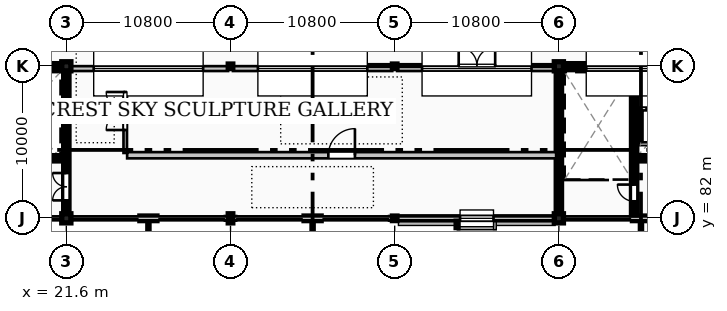
"""IFC4 building model, lengths in metres.
Left out: names, types, materials, properties, quantities, classifications, styles, units other than length and angle.
Written with IfcOpenShell. Run it as: python <this file> out.ifc"""

import sys

from ifc_helpers import new_model, si_unit, direction, frame, frame_2d, origin, origin_2d, place, context, subcontext, project, spatial, rectangle, i_section, extrude, element, fill, save


model = new_model("IFC4")
c1 = context("Model", 3, precision=1e-05, world=origin(), true_north=direction((0.0, 1.0)))
c2 = subcontext(c1, "Body", "Model", "MODEL_VIEW")
j1 = project(units=[si_unit("LENGTHUNIT", "METRE"), si_unit("PLANEANGLEUNIT", "RADIAN")], contexts=[c1])
p1 = place(None, origin())
s1 = spatial("IfcSite", under=j1, at=p1, CompositionType="ELEMENT")
p2 = place(p1, origin())
s2 = spatial("IfcBuilding", under=s1, at=p2, CompositionType="ELEMENT")
p3 = place(p2, frame((0.0, 0.0, 28.8)))
s3 = spatial("IfcBuildingStorey", under=s2, at=p3, CompositionType="ELEMENT", Elevation=28.8)
for number, where, z_axis, x_axis in (
    (1, (21.6, 82.0, 0.0), (0.0, 0.0, 1.0), (1.0, 0.0, 0.0)),
    (2, (21.6, 92.0, 0.0), (0.0, 0.0, 1.0), (1.0, 0.0, 0.0)),
):
    element("IfcColumn", number, at=place(p3, frame(where, z_axis=z_axis, x_axis=x_axis)), inside=s3, PredefinedType="COLUMN", context=c2, shape_type="SweptSolid", body=[
        extrude(rectangle(XDim=0.6, YDim=0.6, at=origin_2d()), origin(), (0.0, 0.0, 1.0), 5.4),
    ])
p4 = place(p3, frame((32.4, 82.0, 0.0), z_axis=(0.0, 0.0, 1.0), x_axis=(1.0, 0.0, 0.0)))
e3 = element("IfcColumn", 3, at=p4, inside=s3, PredefinedType="COLUMN", context=c2, shape_type="SweptSolid", body=[
    extrude(i_section(OverallWidth=0.3, OverallDepth=0.6, WebThickness=0.015, FlangeThickness=0.03, FilletRadius=0.027, at=origin_2d()), origin(), (0.0, 0.0, 1.0), 5.4),
])
for number, where, z_axis, x_axis in (
    (4, (32.4, 92.0, 0.0), (0.0, 0.0, 1.0), (1.0, 0.0, 0.0)),
    (5, (43.2, 82.0, 0.0), (0.0, 0.0, 1.0), (1.0, 0.0, 0.0)),
    (6, (43.2, 92.0, 0.0), (0.0, 0.0, 1.0), (1.0, 0.0, 0.0)),
):
    element("IfcColumn", number, at=place(p3, frame(where, z_axis=z_axis, x_axis=x_axis)), inside=s3, PredefinedType="COLUMN", context=c2, shape_type="SweptSolid", body=[
        extrude(i_section(OverallWidth=0.3, OverallDepth=0.3, WebThickness=0.011, FlangeThickness=0.019, FilletRadius=0.027, at=origin_2d()), origin(), (0.0, 0.0, 1.0), 5.4),
    ])
for number, where, z_axis, x_axis in (
    (7, (54.0, 82.0, 0.0), (0.0, 0.0, 1.0), (1.0, 0.0, 0.0)),
    (8, (54.0, 92.0, 0.0), (0.0, 0.0, 1.0), (1.0, 0.0, 0.0)),
):
    element("IfcColumn", number, at=place(p3, frame(where, z_axis=z_axis, x_axis=x_axis)), inside=s3, PredefinedType="COLUMN", context=c2, shape_type="SweptSolid", body=[
        extrude(rectangle(XDim=0.6, YDim=0.6, at=origin_2d()), origin(), (0.0, 0.0, 1.0), 5.4),
    ])
p5 = place(p3, frame((21.23, 82.0, 0.0), z_axis=(0.0, 0.0, 1.0), x_axis=(1.0, 0.0, 0.0)))
e9 = element("IfcWall", 9, at=p5, inside=s3, PredefinedType="STANDARD", context=c2, shape_type="SweptSolid", body=[
    extrude(rectangle(XDim=0.225, YDim=0.3, at=frame_2d((0.113, 0.0))), origin(), (0.0, 0.0, 1.0), 5.16),
])
p6 = place(p3, frame((26.35, 82.0, 0.0), z_axis=(0.0, 0.0, 1.0), x_axis=(1.0, 0.0, 0.0)))
e10 = element("IfcWall", 10, at=p6, inside=s3, PredefinedType="STANDARD", context=c2, shape_type="SweptSolid", body=[
    extrude(rectangle(XDim=1.3, YDim=0.48, at=frame_2d((0.65, 0.0))), origin(), (0.0, 0.0, 1.0), 5.044),
])
for number, where, z_axis, x_axis in (
    (11, (21.745, 82.0, 0.0), (0.0, 0.0, 1.0), (1.0, 0.0, 0.0)),
    (12, (32.03, 82.0, 0.0), (0.0, 0.0, 1.0), (1.0, 0.0, 0.0)),
):
    element("IfcWall", number, at=place(p3, frame(where, z_axis=z_axis, x_axis=x_axis)), inside=s3, PredefinedType="STANDARD", context=c2, shape_type="SweptSolid", body=[
        extrude(rectangle(XDim=0.225, YDim=0.3, at=frame_2d((0.112, 0.0))), origin(), (0.0, 0.0, 1.0), 5.16),
    ])
p7 = place(p3, frame((37.15, 82.0, 0.0), z_axis=(0.0, 0.0, 1.0), x_axis=(1.0, 0.0, 0.0)))
e13 = element("IfcWall", 13, at=p7, inside=s3, PredefinedType="STANDARD", context=c2, shape_type="SweptSolid", body=[
    extrude(rectangle(XDim=1.3, YDim=0.48, at=frame_2d((0.65, 0.0))), origin(), (0.0, 0.0, 1.0), 5.044),
])
p8 = place(p3, frame((32.545, 82.0, 0.0), z_axis=(0.0, 0.0, 1.0), x_axis=(1.0, 0.0, 0.0)))
e14 = element("IfcWall", 14, at=p8, inside=s3, PredefinedType="STANDARD", context=c2, shape_type="SweptSolid", body=[
    extrude(rectangle(XDim=0.225, YDim=0.3, at=frame_2d((0.113, 0.0))), origin(), (0.0, 0.0, 1.0), 5.16),
])
p9 = place(p3, frame((42.83, 82.0, 0.0), z_axis=(0.0, 0.0, 1.0), x_axis=(1.0, 0.0, 0.0)))
e15 = element("IfcWall", 15, at=p9, inside=s3, PredefinedType="STANDARD", context=c2, shape_type="SweptSolid", body=[
    extrude(rectangle(XDim=0.225, YDim=0.3, at=frame_2d((0.112, 0.0))), origin(), (0.0, 0.0, 1.0), 5.16),
])
p10 = place(p3, frame((43.345, 82.0, 0.0), z_axis=(0.0, 0.0, 1.0), x_axis=(1.0, 0.0, 0.0)))
e16 = element("IfcWall", 16, at=p10, inside=s3, PredefinedType="STANDARD", context=c2, shape_type="SweptSolid", body=[
    extrude(rectangle(XDim=10.51, YDim=0.38, at=frame_2d((5.255, 0.0))), origin(), (0.0, 0.0, 1.0), 5.044),
])
p11 = place(p10, frame((4.155, 0.0, 1.0)))
e17 = element("IfcOpeningElement", 17, at=p11, cuts=e16, PredefinedType="OPENING", context=c2, shape_type="SweptSolid", body=[
    extrude(rectangle(XDim=2.2, YDim=3.0, at=frame_2d((1.1, 1.5))), frame((0.0, 0.2, 0.0), z_axis=(0.0, -1.0, 0.0), x_axis=(1.0, 0.0, 0.0)), (0.0, 0.0, 1.0), 0.4),
])
p12 = place(p3, frame((58.75, 82.0, 0.0), z_axis=(0.0, 0.0, 1.0), x_axis=(1.0, 0.0, 0.0)))
e18 = element("IfcWall", 18, at=p12, inside=s3, PredefinedType="STANDARD", context=c2, shape_type="SweptSolid", body=[
    extrude(rectangle(XDim=1.3, YDim=0.48, at=frame_2d((0.65, 0.0))), origin(), (0.0, 0.0, 1.0), 5.044),
])
p13 = place(p3, frame((54.145, 82.0, 0.0), z_axis=(0.0, 0.0, 1.0), x_axis=(1.0, 0.0, 0.0)))
e19 = element("IfcWall", 19, at=p13, inside=s3, PredefinedType="STANDARD", context=c2, shape_type="SweptSolid", body=[
    extrude(rectangle(XDim=0.225, YDim=0.3, at=frame_2d((0.113, 0.0))), origin(), (0.0, 0.0, 1.0), 5.16),
])
p14 = place(p3, frame((10.96, 91.85, 5.4), z_axis=(0.0, 0.0, 1.0), x_axis=(1.0, 0.0, 0.0)))
e20 = element("IfcWall", 20, at=p14, inside=s3, PredefinedType="STANDARD", context=c2, shape_type="SweptSolid", body=[
    extrude(rectangle(XDim=10.48, YDim=0.32, at=frame_2d((5.24, 0.0))), origin(), (0.0, 0.0, 1.0), 2.45),
])
p15 = place(p14, frame((1.64, 0.0, 0.45)))
e21 = element("IfcOpeningElement", 21, at=p15, cuts=e20, PredefinedType="OPENING", context=c2, shape_type="SweptSolid", body=[
    extrude(rectangle(XDim=7.2, YDim=1.5, at=frame_2d((3.6, 0.75))), frame((0.0, 0.17, 0.0), z_axis=(0.0, -1.0, 0.0), x_axis=(1.0, 0.0, 0.0)), (0.0, 0.0, 1.0), 0.34),
])
p16 = place(p3, frame((21.76, 91.85, 5.4), z_axis=(0.0, 0.0, 1.0), x_axis=(1.0, 0.0, 0.0)))
e22 = element("IfcWall", 22, at=p16, inside=s3, PredefinedType="STANDARD", context=c2, shape_type="SweptSolid", body=[
    extrude(rectangle(XDim=10.48, YDim=0.32, at=frame_2d((5.24, 0.0))), origin(), (0.0, 0.0, 1.0), 2.45),
])
p17 = place(p16, frame((1.64, 0.0, 0.45)))
e23 = element("IfcOpeningElement", 23, at=p17, cuts=e22, PredefinedType="OPENING", context=c2, shape_type="SweptSolid", body=[
    extrude(rectangle(XDim=7.2, YDim=1.5, at=frame_2d((3.6, 0.75))), frame((0.0, 0.17, 0.0), z_axis=(0.0, -1.0, 0.0), x_axis=(1.0, 0.0, 0.0)), (0.0, 0.0, 1.0), 0.34),
])
p18 = place(p3, frame((32.56, 91.85, 5.4), z_axis=(0.0, 0.0, 1.0), x_axis=(1.0, 0.0, 0.0)))
e24 = element("IfcWall", 24, at=p18, inside=s3, PredefinedType="STANDARD", context=c2, shape_type="SweptSolid", body=[
    extrude(rectangle(XDim=10.48, YDim=0.32, at=frame_2d((5.24, 0.0))), origin(), (0.0, 0.0, 1.0), 2.45),
])
p19 = place(p18, frame((1.64, 0.0, 0.45)))
e25 = element("IfcOpeningElement", 25, at=p19, cuts=e24, PredefinedType="OPENING", context=c2, shape_type="SweptSolid", body=[
    extrude(rectangle(XDim=7.2, YDim=1.5, at=frame_2d((3.6, 0.75))), frame((0.0, 0.17, 0.0), z_axis=(0.0, -1.0, 0.0), x_axis=(1.0, 0.0, 0.0)), (0.0, 0.0, 1.0), 0.34),
])
p20 = place(p3, frame((43.36, 91.85, 5.4), z_axis=(0.0, 0.0, 1.0), x_axis=(1.0, 0.0, 0.0)))
e26 = element("IfcWall", 26, at=p20, inside=s3, PredefinedType="STANDARD", context=c2, shape_type="SweptSolid", body=[
    extrude(rectangle(XDim=10.48, YDim=0.32, at=frame_2d((5.24, 0.0))), origin(), (0.0, 0.0, 1.0), 2.45),
])
p21 = place(p20, frame((1.64, 0.0, 0.45)))
e27 = element("IfcOpeningElement", 27, at=p21, cuts=e26, PredefinedType="OPENING", context=c2, shape_type="SweptSolid", body=[
    extrude(rectangle(XDim=7.2, YDim=1.5, at=frame_2d((3.6, 0.75))), frame((0.0, 0.17, 0.0), z_axis=(0.0, -1.0, 0.0), x_axis=(1.0, 0.0, 0.0)), (0.0, 0.0, 1.0), 0.34),
])
p22 = place(p3, frame((54.16, 91.85, 5.4), z_axis=(0.0, 0.0, 1.0), x_axis=(1.0, 0.0, 0.0)))
e28 = element("IfcWall", 28, at=p22, inside=s3, PredefinedType="STANDARD", context=c2, shape_type="SweptSolid", body=[
    extrude(rectangle(XDim=10.48, YDim=0.32, at=frame_2d((5.24, 0.0))), origin(), (0.0, 0.0, 1.0), 2.45),
])
p23 = place(p22, frame((1.64, 0.0, 0.45)))
e29 = element("IfcOpeningElement", 29, at=p23, cuts=e28, PredefinedType="OPENING", context=c2, shape_type="SweptSolid", body=[
    extrude(rectangle(XDim=7.2, YDim=1.5, at=frame_2d((3.6, 0.75))), frame((0.0, 0.17, 0.0), z_axis=(0.0, -1.0, 0.0), x_axis=(1.0, 0.0, 0.0)), (0.0, 0.0, 1.0), 0.34),
])
p24 = place(p3, frame((0.35, 82.0, 5.22), z_axis=(0.0, 0.0, 1.0), x_axis=(1.0, 0.0, 0.0)))
e30 = element("IfcWall", 30, at=p24, inside=s3, PredefinedType="PARAPET", context=c2, shape_type="SweptSolid", body=[
    extrude(rectangle(XDim=74.9, YDim=0.26, at=frame_2d((37.45, 0.0))), origin(), (0.0, 0.0, 1.0), 0.55),
])
p25 = place(p3, frame((11.1, 92.0, 0.0), z_axis=(0.0, 0.0, 1.0), x_axis=(1.0, 0.0, 0.0)))
e31 = element("IfcWall", 31, at=p25, inside=s3, PredefinedType="SHEAR", context=c2, shape_type="SweptSolid", body=[
    extrude(rectangle(XDim=10.2, YDim=0.35, at=frame_2d((5.1, 0.0))), origin(), (0.0, 0.0, 1.0), 5.16),
])
p26 = place(p3, frame((21.6, 82.3, 0.0), z_axis=(0.0, 0.0, 1.0), x_axis=(0.0, 1.0, 0.0)))
e32 = element("IfcWall", 32, at=p26, inside=s3, PredefinedType="SHEAR", context=c2, shape_type="SweptSolid", body=[
    extrude(rectangle(XDim=9.4, YDim=0.35, at=frame_2d((4.7, 0.0))), origin(), (0.0, 0.0, 1.0), 5.16),
])
p27 = place(p26, frame((0.88, 0.0, 0.0)))
e33 = element("IfcOpeningElement", 33, at=p27, cuts=e32, PredefinedType="OPENING", context=c2, shape_type="SweptSolid", body=[
    extrude(rectangle(XDim=1.8, YDim=2.25, at=frame_2d((0.9, 1.125))), frame((0.0, 0.185, 0.0), z_axis=(0.0, -1.0, 0.0), x_axis=(1.0, 0.0, 0.0)), (0.0, 0.0, 1.0), 0.37),
])
p28 = place(p3, frame((15.93, 85.95, 0.0), z_axis=(0.0, 0.0, 1.0), x_axis=(1.0, 0.0, 0.0)))
e34 = element("IfcWall", 34, at=p28, inside=s3, PredefinedType="SHEAR", context=c2, shape_type="SweptSolid", body=[
    extrude(rectangle(XDim=5.49, YDim=0.35, at=frame_2d((2.745, 0.0))), origin(), (0.0, 0.0, 1.0), 5.16),
])
p29 = place(p28, frame((0.65, 0.0, 0.0)))
e35 = element("IfcOpeningElement", 35, at=p29, cuts=e34, PredefinedType="OPENING", context=c2, shape_type="SweptSolid", body=[
    extrude(rectangle(XDim=1.1, YDim=2.2, at=frame_2d((0.55, 1.1))), frame((0.0, 0.185, 0.0), z_axis=(0.0, -1.0, 0.0), x_axis=(1.0, 0.0, 0.0)), (0.0, 0.0, 1.0), 0.37),
])
p30 = place(p28, frame((2.85, 0.0, 0.0)))
e36 = element("IfcOpeningElement", 36, at=p30, cuts=e34, PredefinedType="OPENING", context=c2, shape_type="SweptSolid", body=[
    extrude(rectangle(XDim=1.1, YDim=2.2, at=frame_2d((0.55, 1.1))), frame((0.0, 0.185, 0.0), z_axis=(0.0, -1.0, 0.0), x_axis=(1.0, 0.0, 0.0)), (0.0, 0.0, 1.0), 0.37),
])
p31 = place(p3, frame((54.3, 92.0, 0.0), z_axis=(0.0, 0.0, 1.0), x_axis=(1.0, 0.0, 0.0)))
e37 = element("IfcWall", 37, at=p31, inside=s3, PredefinedType="SHEAR", context=c2, shape_type="SweptSolid", body=[
    extrude(rectangle(XDim=10.2, YDim=0.35, at=frame_2d((5.1, 0.0))), origin(), (0.0, 0.0, 1.0), 5.16),
])
p32 = place(p3, frame((54.0, 82.3, 0.0), z_axis=(0.0, 0.0, 1.0), x_axis=(0.0, 1.0, 0.0)))
e38 = element("IfcWall", 38, at=p32, inside=s3, PredefinedType="SHEAR", context=c2, shape_type="SweptSolid", body=[
    extrude(rectangle(XDim=9.4, YDim=0.35, at=frame_2d((4.7, 0.0))), origin(), (0.0, 0.0, 1.0), 5.16),
])
p33 = place(p3, frame((58.95, 82.22, 0.0), z_axis=(0.0, 0.0, 1.0), x_axis=(0.0, 1.0, 0.0)))
e39 = element("IfcWall", 39, at=p33, inside=s3, PredefinedType="SHEAR", context=c2, shape_type="SweptSolid", body=[
    extrude(rectangle(XDim=9.605, YDim=0.35, at=frame_2d((4.802, 0.0))), origin(), (0.0, 0.0, 1.0), 5.16),
])
p34 = place(p33, frame((0.9, 0.0, 0.0)))
e40 = element("IfcOpeningElement", 40, at=p34, cuts=e39, PredefinedType="OPENING", context=c2, shape_type="SweptSolid", body=[
    extrude(rectangle(XDim=1.1, YDim=2.2, at=frame_2d((0.55, 1.1))), frame((0.0, 0.185, 0.0), z_axis=(0.0, -1.0, 0.0), x_axis=(1.0, 0.0, 0.0)), (0.0, 0.0, 1.0), 0.37),
])
p35 = place(p3, frame((59.13, 85.95, 0.0), z_axis=(0.0, 0.0, 1.0), x_axis=(1.0, 0.0, 0.0)))
e41 = element("IfcWall", 41, at=p35, inside=s3, PredefinedType="SHEAR", context=c2, shape_type="SweptSolid", body=[
    extrude(rectangle(XDim=5.49, YDim=0.35, at=frame_2d((2.745, 0.0))), origin(), (0.0, 0.0, 1.0), 5.16),
])
p36 = place(p35, frame((0.65, 0.0, 0.0)))
e42 = element("IfcOpeningElement", 42, at=p36, cuts=e41, PredefinedType="OPENING", context=c2, shape_type="SweptSolid", body=[
    extrude(rectangle(XDim=1.1, YDim=2.2, at=frame_2d((0.55, 1.1))), frame((0.0, 0.185, 0.0), z_axis=(0.0, -1.0, 0.0), x_axis=(1.0, 0.0, 0.0)), (0.0, 0.0, 1.0), 0.37),
])
p37 = place(p35, frame((2.85, 0.0, 0.0)))
e43 = element("IfcOpeningElement", 43, at=p37, cuts=e41, PredefinedType="OPENING", context=c2, shape_type="SweptSolid", body=[
    extrude(rectangle(XDim=2.0, YDim=2.5, at=frame_2d((1.0, 1.25))), frame((0.0, 0.185, 0.0), z_axis=(0.0, -1.0, 0.0), x_axis=(1.0, 0.0, 0.0)), (0.0, 0.0, 1.0), 0.37),
])
p38 = place(p3, frame((25.6, 86.15, 0.0), z_axis=(0.0, 0.0, 1.0), x_axis=(1.0, 0.0, 0.0)))
e44 = element("IfcWall", 44, at=p38, inside=s3, PredefinedType="PARTITIONING", context=c2, shape_type="SweptSolid", body=[
    extrude(rectangle(XDim=28.22, YDim=0.41, at=frame_2d((14.11, 0.0))), origin(), (0.0, 0.0, 1.0), 5.12),
])
p39 = place(p38, frame((13.235, 0.0, 0.0)))
e45 = element("IfcOpeningElement", 45, at=p39, cuts=e44, PredefinedType="OPENING", context=c2, shape_type="SweptSolid", body=[
    extrude(rectangle(XDim=1.75, YDim=2.45, at=frame_2d((0.875, 1.225))), frame((0.0, 0.215, 0.0), z_axis=(0.0, -1.0, 0.0), x_axis=(1.0, 0.0, 0.0)), (0.0, 0.0, 1.0), 0.43),
])
p40 = place(p3, frame((38.2, 92.05, 0.0), z_axis=(0.0, 0.0, 1.0), x_axis=(1.0, 0.0, 0.0)))
e46 = element("IfcWall", 46, at=p40, inside=s3, PredefinedType="PARTITIONING", context=c2, shape_type="SweptSolid", body=[
    extrude(rectangle(XDim=4.8, YDim=0.17, at=frame_2d((2.4, 0.0))), origin(), (0.0, 0.0, 1.0), 5.044),
])
p41 = place(p3, frame((43.4, 92.05, 0.0), z_axis=(0.0, 0.0, 1.0), x_axis=(1.0, 0.0, 0.0)))
e47 = element("IfcWall", 47, at=p41, inside=s3, PredefinedType="PARTITIONING", context=c2, shape_type="SweptSolid", body=[
    extrude(rectangle(XDim=10.42, YDim=0.17, at=frame_2d((5.21, 0.0))), origin(), (0.0, 0.0, 1.0), 5.044),
])
p42 = place(p41, frame((4.01, 0.0, 0.0)))
e48 = element("IfcOpeningElement", 48, at=p42, cuts=e47, PredefinedType="OPENING", context=c2, shape_type="SweptSolid", body=[
    extrude(rectangle(XDim=2.4, YDim=2.8, at=frame_2d((1.2, 1.4))), frame((0.0, 0.095, 0.0), z_axis=(0.0, -1.0, 0.0), x_axis=(1.0, 0.0, 0.0)), (0.0, 0.0, 1.0), 0.19),
])
p43 = place(p3, frame((25.475, 86.3, 0.0), z_axis=(0.0, 0.0, 1.0), x_axis=(0.0, 1.0, 0.0)))
e49 = element("IfcWall", 49, at=p43, inside=s3, PredefinedType="PARTITIONING", context=c2, shape_type="SweptSolid", body=[
    extrude(rectangle(XDim=5.52, YDim=0.23, at=frame_2d((2.76, 0.0))), origin(), (0.0, 0.0, 1.0), 5.12),
])
p44 = place(p43, frame((1.51, 0.0, 0.0)))
e50 = element("IfcOpeningElement", 50, at=p44, cuts=e49, PredefinedType="OPENING", context=c2, shape_type="SweptSolid", body=[
    extrude(rectangle(XDim=2.5, YDim=2.75, at=frame_2d((1.25, 1.375))), frame((0.0, 0.125, 0.0), z_axis=(0.0, -1.0, 0.0), x_axis=(1.0, 0.0, 0.0)), (0.0, 0.0, 1.0), 0.25),
])
p45 = place(p11, origin())
e51 = element("IfcWindow", 51, at=p45, inside=s3, PartitioningType="SINGLE_PANEL", PredefinedType="WINDOW", context=c2, shape_type="SweptSolid", body=[
    extrude(rectangle(XDim=2.2, YDim=3.0, at=frame_2d((1.1, 1.5))), frame((0.0, 0.03, 0.0), z_axis=(0.0, -1.0, 0.0), x_axis=(1.0, 0.0, 0.0)), (0.0, 0.0, 1.0), 0.06),
])
fill(e17, e51)
p46 = place(p17, origin())
e52 = element("IfcWindow", 52, at=p46, inside=s3, PartitioningType="SINGLE_PANEL", PredefinedType="SKYLIGHT", context=c2, shape_type="SweptSolid", body=[
    extrude(rectangle(XDim=7.2, YDim=1.5, at=frame_2d((3.6, 0.75))), frame((0.0, 0.03, 0.0), z_axis=(0.0, -1.0, 0.0), x_axis=(1.0, 0.0, 0.0)), (0.0, 0.0, 1.0), 0.06),
])
fill(e23, e52)
p47 = place(p19, origin())
e53 = element("IfcWindow", 53, at=p47, inside=s3, PartitioningType="SINGLE_PANEL", PredefinedType="SKYLIGHT", context=c2, shape_type="SweptSolid", body=[
    extrude(rectangle(XDim=7.2, YDim=1.5, at=frame_2d((3.6, 0.75))), frame((0.0, 0.03, 0.0), z_axis=(0.0, -1.0, 0.0), x_axis=(1.0, 0.0, 0.0)), (0.0, 0.0, 1.0), 0.06),
])
fill(e25, e53)
p48 = place(p21, origin())
e54 = element("IfcWindow", 54, at=p48, inside=s3, PartitioningType="SINGLE_PANEL", PredefinedType="SKYLIGHT", context=c2, shape_type="SweptSolid", body=[
    extrude(rectangle(XDim=7.2, YDim=1.5, at=frame_2d((3.6, 0.75))), frame((0.0, 0.03, 0.0), z_axis=(0.0, -1.0, 0.0), x_axis=(1.0, 0.0, 0.0)), (0.0, 0.0, 1.0), 0.06),
])
fill(e27, e54)
p49 = place(p23, origin())
e55 = element("IfcWindow", 55, at=p49, inside=s3, PartitioningType="SINGLE_PANEL", PredefinedType="SKYLIGHT", context=c2, shape_type="SweptSolid", body=[
    extrude(rectangle(XDim=7.2, YDim=1.5, at=frame_2d((3.6, 0.75))), frame((0.0, 0.03, 0.0), z_axis=(0.0, -1.0, 0.0), x_axis=(1.0, 0.0, 0.0)), (0.0, 0.0, 1.0), 0.06),
])
fill(e29, e55)
p50 = place(p27, origin())
e56 = element("IfcDoor", 56, at=p50, inside=s3, OperationType="DOUBLE_DOOR_SINGLE_SWING", PredefinedType="DOOR", context=c2, shape_type="SweptSolid", body=[
    extrude(rectangle(XDim=1.8, YDim=2.25, at=frame_2d((0.9, 1.125))), frame((0.0, 0.025, 0.0), z_axis=(0.0, -1.0, 0.0), x_axis=(1.0, 0.0, 0.0)), (0.0, 0.0, 1.0), 0.05),
])
fill(e33, e56)
p51 = place(p34, origin())
e57 = element("IfcDoor", 57, at=p51, inside=s3, OperationType="SINGLE_SWING_RIGHT", PredefinedType="DOOR", context=c2, shape_type="SweptSolid", body=[
    extrude(rectangle(XDim=1.1, YDim=2.2, at=frame_2d((0.55, 1.1))), frame((0.0, 0.025, 0.0), z_axis=(0.0, -1.0, 0.0), x_axis=(1.0, 0.0, 0.0)), (0.0, 0.0, 1.0), 0.05),
])
fill(e40, e57)
p52 = place(p36, origin())
e58 = element("IfcDoor", 58, at=p52, inside=s3, OperationType="DOUBLE_DOOR_SLIDING", PredefinedType="DOOR", context=c2, shape_type="SweptSolid", body=[
    extrude(rectangle(XDim=1.1, YDim=2.2, at=frame_2d((0.55, 1.1))), frame((0.0, 0.025, 0.0), z_axis=(0.0, -1.0, 0.0), x_axis=(1.0, 0.0, 0.0)), (0.0, 0.0, 1.0), 0.05),
])
fill(e42, e58)
p53 = place(p39, origin())
e59 = element("IfcDoor", 59, at=p53, inside=s3, OperationType="SINGLE_SWING_RIGHT", PredefinedType="DOOR", context=c2, shape_type="SweptSolid", body=[
    extrude(rectangle(XDim=1.75, YDim=2.45, at=frame_2d((0.875, 1.225))), frame((0.0, 0.025, 0.0), z_axis=(0.0, -1.0, 0.0), x_axis=(1.0, 0.0, 0.0)), (0.0, 0.0, 1.0), 0.05),
])
fill(e45, e59)
p54 = place(p42, origin())
e60 = element("IfcDoor", 60, at=p54, inside=s3, OperationType="DOUBLE_DOOR_SINGLE_SWING", PredefinedType="DOOR", context=c2, shape_type="SweptSolid", body=[
    extrude(rectangle(XDim=2.4, YDim=2.8, at=frame_2d((1.2, 1.4))), frame((0.0, 0.025, 0.0), z_axis=(0.0, -1.0, 0.0), x_axis=(1.0, 0.0, 0.0)), (0.0, 0.0, 1.0), 0.05),
])
fill(e48, e60)
p55 = place(p44, origin())
e61 = element("IfcDoor", 61, at=p55, inside=s3, OperationType="DOUBLE_DOOR_SINGLE_SWING", PredefinedType="DOOR", context=c2, shape_type="SweptSolid", body=[
    extrude(rectangle(XDim=2.5, YDim=2.75, at=frame_2d((1.25, 1.375))), frame((0.0, 0.025, 0.0), z_axis=(0.0, -1.0, 0.0), x_axis=(1.0, 0.0, 0.0)), (0.0, 0.0, 1.0), 0.05),
])
fill(e50, e61)
save(model, sys.argv[1])
